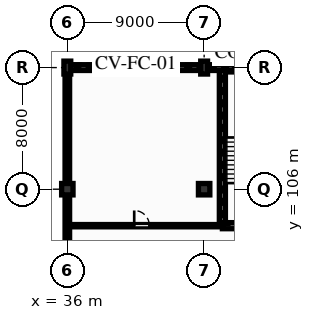
"""IFC4 building model, lengths in metres.
Left out: names, types, materials, properties, quantities, classifications, styles, units other than length and angle.
Written with IfcOpenShell. Run it as: python <this file> out.ifc"""

import sys

from ifc_helpers import new_model, si_unit, direction, frame, frame_2d, origin, origin_2d, place, context, subcontext, project, spatial, rectangle, extrude, element, fill, save


model = new_model("IFC4")
c1 = context("Model", 3, precision=1e-05, world=origin(), true_north=direction((0.0, 1.0)))
c2 = subcontext(c1, "Body", "Model", "MODEL_VIEW")
j1 = project(units=[si_unit("LENGTHUNIT", "METRE"), si_unit("PLANEANGLEUNIT", "RADIAN")], contexts=[c1])
p1 = place(None, origin())
s1 = spatial("IfcSite", under=j1, at=p1, CompositionType="ELEMENT")
p2 = place(p1, origin())
s2 = spatial("IfcBuilding", under=s1, at=p2, CompositionType="ELEMENT")
p3 = place(p2, frame((0.0, 0.0, 8.94)))
s3 = spatial("IfcBuildingStorey", under=s2, at=p3, CompositionType="ELEMENT", Elevation=8.94)
p4 = place(p3, frame((36.0, 106.0, 0.0), z_axis=(0.0, 0.0, 1.0), x_axis=(1.0, 0.0, 0.0)))
e1 = element("IfcColumn", 1, at=p4, inside=s3, PredefinedType="COLUMN", context=c2, shape_type="SweptSolid", body=[
    extrude(rectangle(XDim=0.75, YDim=0.75, at=origin_2d()), origin(), (0.0, 0.0, 1.0), 3.84),
])
p5 = place(p3, frame((36.0, 114.0, 0.0), z_axis=(0.0, 0.0, 1.0), x_axis=(0.0, 1.0, 0.0)))
e2 = element("IfcColumn", 2, at=p5, inside=s3, PredefinedType="COLUMN", context=c2, shape_type="SweptSolid", body=[
    extrude(rectangle(XDim=0.45, YDim=0.85, at=origin_2d()), origin(), (0.0, 0.0, 1.0), 3.84),
])
p6 = place(p3, frame((45.0, 106.0, 0.0), z_axis=(0.0, 0.0, 1.0), x_axis=(1.0, 0.0, 0.0)))
e3 = element("IfcColumn", 3, at=p6, inside=s3, PredefinedType="COLUMN", context=c2, shape_type="SweptSolid", body=[
    extrude(rectangle(XDim=0.75, YDim=0.75, at=origin_2d()), origin(), (0.0, 0.0, 1.0), 3.84),
])
p7 = place(p3, frame((45.0, 114.0, 0.0), z_axis=(0.0, 0.0, 1.0), x_axis=(0.0, 1.0, 0.0)))
e4 = element("IfcColumn", 4, at=p7, inside=s3, PredefinedType="COLUMN", context=c2, shape_type="SweptSolid", body=[
    extrude(rectangle(XDim=0.45, YDim=0.85, at=origin_2d()), origin(), (0.0, 0.0, 1.0), 3.84),
])
p8 = place(p3, frame((36.0, 114.0, 0.0), z_axis=(0.0, 0.0, 1.0), x_axis=(1.0, 0.0, 0.0)))
e5 = element("IfcWall", 5, at=p8, inside=s3, PredefinedType="SOLIDWALL", context=c2, shape_type="SweptSolid", body=[
    extrude(rectangle(XDim=9.0, YDim=0.38, at=frame_2d((4.5, 0.0))), origin(), (0.0, 0.0, 1.0), 3.53),
])
p9 = place(p8, frame((2.2, 0.0, 0.615)))
e6 = element("IfcOpeningElement", 6, at=p9, cuts=e5, PredefinedType="OPENING", context=c2, shape_type="SweptSolid", body=[
    extrude(rectangle(XDim=0.82, YDim=2.15, at=frame_2d((0.41, 1.075))), frame((0.0, 0.2, 0.0), z_axis=(0.0, -1.0, 0.0), x_axis=(1.0, 0.0, 0.0)), (0.0, 0.0, 1.0), 0.4),
])
p10 = place(p8, frame((5.4, 0.0, 0.465)))
e7 = element("IfcOpeningElement", 7, at=p10, cuts=e5, PredefinedType="OPENING", context=c2, shape_type="SweptSolid", body=[
    extrude(rectangle(XDim=1.15, YDim=2.3, at=frame_2d((0.575, 1.15))), frame((0.0, 0.2, 0.0), z_axis=(0.0, -1.0, 0.0), x_axis=(1.0, 0.0, 0.0)), (0.0, 0.0, 1.0), 0.4),
])
p11 = place(p3, frame((45.0, 114.0, 0.0), z_axis=(0.0, 0.0, 1.0), x_axis=(1.0, 0.0, 0.0)))
e8 = element("IfcWall", 8, at=p11, inside=s3, PredefinedType="SOLIDWALL", context=c2, shape_type="SweptSolid", body=[
    extrude(rectangle(XDim=9.0, YDim=0.38, at=frame_2d((4.5, 0.0))), origin(), (0.0, 0.0, 1.0), 3.53),
])
p12 = place(p3, frame((36.0, 82.2, 0.0), z_axis=(0.0, 0.0, 1.0), x_axis=(0.0, 1.0, 0.0)))
e9 = element("IfcWall", 9, at=p12, inside=s3, PredefinedType="SOLIDWALL", context=c2, shape_type="SweptSolid", body=[
    extrude(rectangle(XDim=31.8, YDim=0.3, at=frame_2d((15.9, 0.0))), origin(), (0.0, 0.0, 1.0), 2.805),
])
p13 = place(p12, frame((3.0, 0.0, 0.835)))
e10 = element("IfcOpeningElement", 10, at=p13, cuts=e9, PredefinedType="OPENING", context=c2, shape_type="SweptSolid", body=[
    extrude(rectangle(XDim=1.35, YDim=1.85, at=frame_2d((0.675, 0.925))), frame((0.0, 0.16, 0.0), z_axis=(0.0, -1.0, 0.0), x_axis=(1.0, 0.0, 0.0)), (0.0, 0.0, 1.0), 0.32),
])
p14 = place(p12, frame((9.5, 0.0, 0.935)))
e11 = element("IfcOpeningElement", 11, at=p14, cuts=e9, PredefinedType="OPENING", context=c2, shape_type="SweptSolid", body=[
    extrude(rectangle(XDim=1.05, YDim=1.75, at=frame_2d((0.525, 0.875))), frame((0.0, 0.16, 0.0), z_axis=(0.0, -1.0, 0.0), x_axis=(1.0, 0.0, 0.0)), (0.0, 0.0, 1.0), 0.32),
])
p15 = place(p12, frame((16.5, 0.0, 0.585)))
e12 = element("IfcOpeningElement", 12, at=p15, cuts=e9, PredefinedType="OPENING", context=c2, shape_type="SweptSolid", body=[
    extrude(rectangle(XDim=1.5, YDim=2.1, at=frame_2d((0.75, 1.05))), frame((0.0, 0.16, 0.0), z_axis=(0.0, -1.0, 0.0), x_axis=(1.0, 0.0, 0.0)), (0.0, 0.0, 1.0), 0.32),
])
p16 = place(p3, frame((46.2, 103.6, 0.0), z_axis=(0.0, 0.0, 1.0), x_axis=(1.0, 0.0, 0.0)))
e13 = element("IfcWall", 13, at=p16, inside=s3, PredefinedType="SHEAR", context=c2, shape_type="SweptSolid", body=[
    extrude(rectangle(XDim=13.2, YDim=0.4, at=frame_2d((6.6, 0.0))), origin(), (0.0, 0.0, 1.0), 3.53),
])
p17 = place(p16, frame((5.8, 0.0, 0.0)))
e14 = element("IfcOpeningElement", 14, at=p17, cuts=e13, PredefinedType="OPENING", context=c2, shape_type="SweptSolid", body=[
    extrude(rectangle(XDim=1.5, YDim=2.2, at=frame_2d((0.75, 1.1))), frame((0.0, 0.21, 0.0), z_axis=(0.0, -1.0, 0.0), x_axis=(1.0, 0.0, 0.0)), (0.0, 0.0, 1.0), 0.42),
])
p18 = place(p3, frame((46.2, 103.8, 0.0), z_axis=(0.0, 0.0, 1.0), x_axis=(0.0, 1.0, 0.0)))
e15 = element("IfcWall", 15, at=p18, inside=s3, PredefinedType="SHEAR", context=c2, shape_type="SweptSolid", body=[
    extrude(rectangle(XDim=10.01, YDim=0.4, at=frame_2d((5.005, 0.0))), origin(), (0.0, 0.0, 1.0), 3.53),
])
p19 = place(p3, frame((36.0, 103.6, 0.0), z_axis=(0.0, 0.0, 1.0), x_axis=(1.0, 0.0, 0.0)))
e16 = element("IfcWall", 16, at=p19, inside=s3, PredefinedType="PARTITIONING", context=c2, shape_type="SweptSolid", body=[
    extrude(rectangle(XDim=10.2, YDim=0.15, at=frame_2d((5.1, 0.0))), origin(), (0.0, 0.0, 1.0), 3.53),
])
p20 = place(p19, frame((4.4, 0.0, 0.0)))
e17 = element("IfcOpeningElement", 17, at=p20, cuts=e16, PredefinedType="OPENING", context=c2, shape_type="SweptSolid", body=[
    extrude(rectangle(XDim=1.0, YDim=2.15, at=frame_2d((0.5, 1.075))), frame((0.0, 0.085, 0.0), z_axis=(0.0, -1.0, 0.0), x_axis=(1.0, 0.0, 0.0)), (0.0, 0.0, 1.0), 0.17),
])
p21 = place(p9, origin())
e18 = element("IfcWindow", 18, at=p21, inside=s3, PartitioningType="SINGLE_PANEL", PredefinedType="WINDOW", context=c2, shape_type="SweptSolid", body=[
    extrude(rectangle(XDim=0.82, YDim=2.15, at=frame_2d((0.41, 1.075))), frame((0.0, 0.03, 0.0), z_axis=(0.0, -1.0, 0.0), x_axis=(1.0, 0.0, 0.0)), (0.0, 0.0, 1.0), 0.06),
])
fill(e6, e18)
p22 = place(p10, origin())
e19 = element("IfcWindow", 19, at=p22, inside=s3, PartitioningType="SINGLE_PANEL", PredefinedType="WINDOW", context=c2, shape_type="SweptSolid", body=[
    extrude(rectangle(XDim=1.15, YDim=2.3, at=frame_2d((0.575, 1.15))), frame((0.0, 0.03, 0.0), z_axis=(0.0, -1.0, 0.0), x_axis=(1.0, 0.0, 0.0)), (0.0, 0.0, 1.0), 0.06),
])
fill(e7, e19)
p23 = place(p20, origin())
e20 = element("IfcDoor", 20, at=p23, inside=s3, OperationType="SINGLE_SWING_LEFT", PredefinedType="DOOR", context=c2, shape_type="SweptSolid", body=[
    extrude(rectangle(XDim=1.0, YDim=2.15, at=frame_2d((0.5, 1.075))), frame((0.0, 0.025, 0.0), z_axis=(0.0, -1.0, 0.0), x_axis=(1.0, 0.0, 0.0)), (0.0, 0.0, 1.0), 0.05),
])
fill(e17, e20)
save(model, sys.argv[1])
